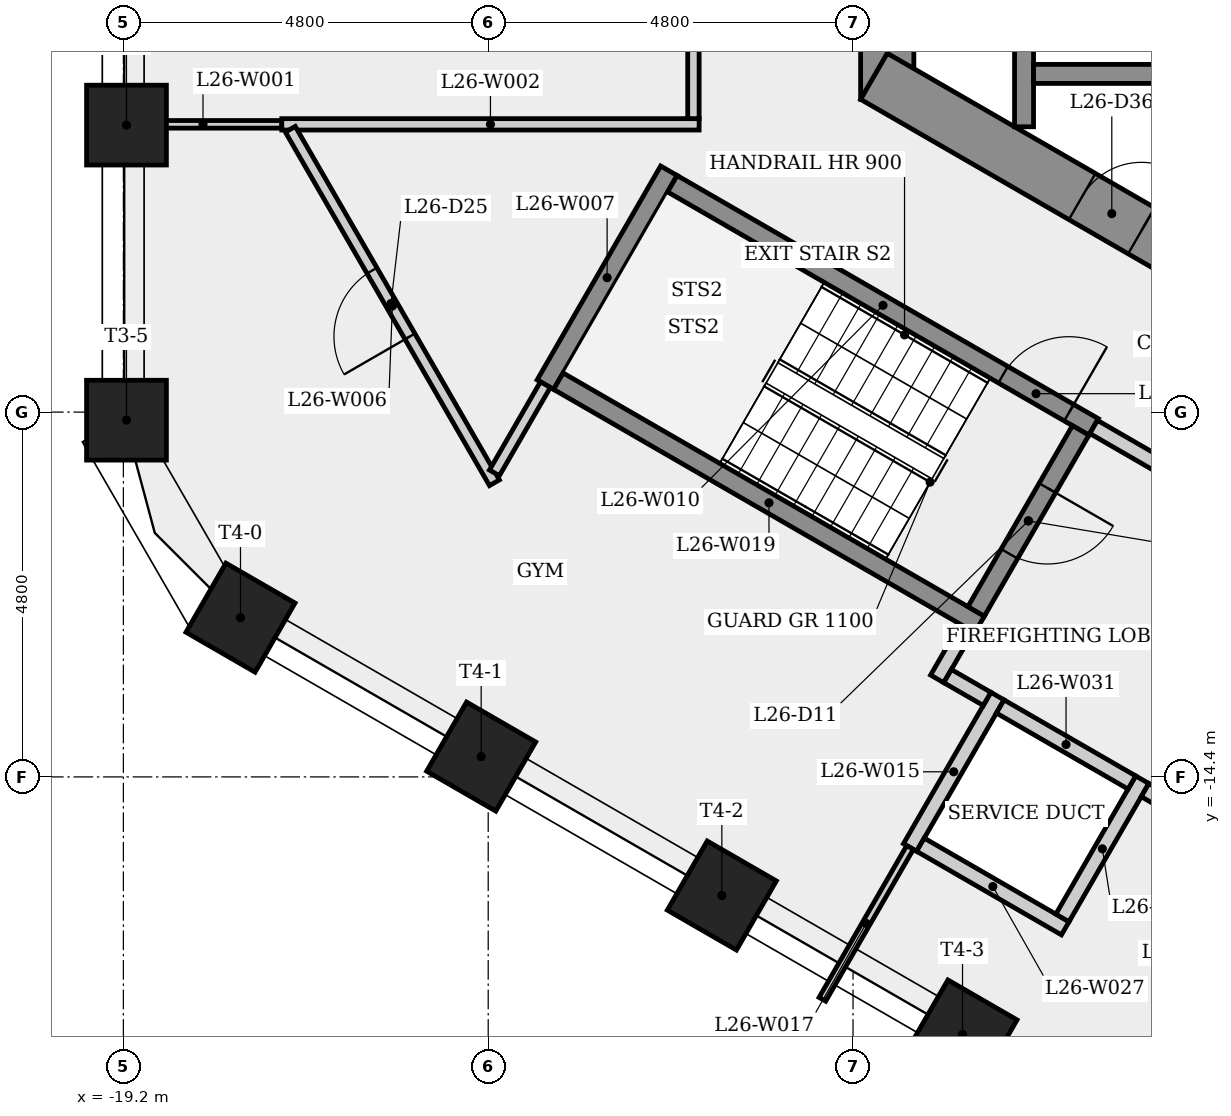
"""IFC4 building model, lengths in metres.
Left out: names, types, materials, properties, quantities, classifications, styles, units other than length and angle.
Written with IfcOpenShell. Run it as: python <this file> out.ifc"""

import sys

from ifc_helpers import new_model, si_unit, direction, frame, frame_2d, origin, origin_2d, place, context, subcontext, project, spatial, rectangle, extrude, element, fill, save


model = new_model("IFC4")
c1 = context("Model", 3, precision=1e-05, world=origin(), true_north=direction((0.0, 1.0)))
c2 = subcontext(c1, "Body", "Model", "MODEL_VIEW")
j1 = project(units=[si_unit("LENGTHUNIT", "METRE"), si_unit("PLANEANGLEUNIT", "RADIAN")], contexts=[c1])
p1 = place(None, origin())
s1 = spatial("IfcSite", under=j1, at=p1, CompositionType="ELEMENT")
p2 = place(p1, origin())
s2 = spatial("IfcBuilding", under=s1, at=p2, CompositionType="ELEMENT")
p3 = place(p2, frame((0.0, 0.0, 100.1)))
s3 = spatial("IfcBuildingStorey", under=s2, at=p3, CompositionType="ELEMENT", Elevation=100.1)
p4 = place(p3, frame((-9.15, 5.485, 0.0), z_axis=(0.0, 0.0, 1.0), x_axis=(0.0, -1.0, 0.0)))
e1 = element("IfcWall", 1, at=p4, inside=s3, PredefinedType="SHEAR", context=c2, shape_type="SweptSolid", body=[
    extrude(rectangle(XDim=10.97, YDim=0.7, at=frame_2d((5.485, 0.0))), origin(), (0.0, 0.0, 1.0), 3.4),
])
p5 = place(p4, frame((4.685, 0.0, 0.0)))
e2 = element("IfcOpeningElement", 2, at=p5, cuts=e1, PredefinedType="OPENING", context=c2, shape_type="SweptSolid", body=[
    extrude(rectangle(XDim=1.6, YDim=2.1, at=frame_2d((0.8, 1.05))), frame((0.0, 0.36, 0.0), z_axis=(0.0, -1.0, 0.0), x_axis=(1.0, 0.0, 0.0)), (0.0, 0.0, 1.0), 0.72),
])
p6 = place(p3, frame((-9.325, -5.182, 0.0), z_axis=(0.0, 0.0, 1.0), x_axis=(0.866023993627, -0.500002442456, 0.0)))
e3 = element("IfcWall", 3, at=p6, inside=s3, PredefinedType="SHEAR", context=c2, shape_type="SweptSolid", body=[
    extrude(rectangle(XDim=10.97, YDim=0.7, at=frame_2d((5.485, 0.0))), origin(), (0.0, 0.0, 1.0), 3.4),
])
p7 = place(p6, frame((3.164, 0.0, 0.0)))
e4 = element("IfcOpeningElement", 4, at=p7, cuts=e3, PredefinedType="OPENING", context=c2, shape_type="SweptSolid", body=[
    extrude(rectangle(XDim=0.9, YDim=2.1, at=frame_2d((0.45, 1.05))), frame((0.0, 0.36, 0.0), z_axis=(0.0, -1.0, 0.0), x_axis=(1.0, 0.0, 0.0)), (0.0, 0.0, 1.0), 0.72),
])
for number, where, z_axis, x_axis in (
    (5, (-19.159, -5.824, 0.0), (0.0, 0.0, 1.0), (-1.0, 0.0, 0.0)),
    (6, (-19.159, -9.706, 0.0), (0.0, 0.0, 1.0), (-1.0, 0.0, 0.0)),
    (7, (-17.659, -12.304, 0.0), (0.0, 0.0, 1.0), (-0.5, -0.866, 0.0)),
    (8, (-14.493, -14.133, 0.0), (0.0, 0.0, 1.0), (-0.5, -0.866, 0.0)),
    (9, (-11.326, -15.961, 0.0), (0.0, 0.0, 1.0), (-0.5, -0.866, 0.0)),
    (10, (-8.159, -17.789, 0.0), (0.0, 0.0, 1.0), (-0.5, -0.866, 0.0)),
):
    element("IfcColumn", number, at=place(p3, frame(where, z_axis=z_axis, x_axis=x_axis)), inside=s3, PredefinedType="COLUMN", context=c2, shape_type="SweptSolid", body=[
        extrude(rectangle(XDim=1.05, YDim=1.05, at=origin_2d()), origin(), (0.0, 0.0, 1.0), 3.4),
    ])
p8 = place(p3, frame((-17.116, -5.814, 0.0), z_axis=(0.0, 0.0, 1.0), x_axis=(-1.0, 0.0, 0.0)))
e11 = element("IfcWall", 11, at=p8, inside=s3, PredefinedType="PARTITIONING", context=c2, shape_type="SweptSolid", body=[
    extrude(rectangle(XDim=2.073, YDim=0.1, at=frame_2d((1.037, 0.0))), origin(), (0.0, 0.0, 1.0), 3.05),
])
p9 = place(p3, frame((-17.116, -5.814, 0.0), z_axis=(0.0, 0.0, 1.0), x_axis=(1.0, 0.0, 0.0)))
e12 = element("IfcWall", 12, at=p9, inside=s3, PredefinedType="PARTITIONING", context=c2, shape_type="SweptSolid", body=[
    extrude(rectangle(XDim=5.491, YDim=0.15, at=frame_2d((2.745, 0.0))), origin(), (0.0, 0.0, 1.0), 3.05),
])
p10 = place(p3, frame((-14.318, -10.53, 0.0), z_axis=(0.0, 0.0, 1.0), x_axis=(-0.499996591357, 0.866027371756, 0.0)))
e13 = element("IfcWall", 13, at=p10, inside=s3, PredefinedType="PARTITIONING", context=c2, shape_type="SweptSolid", body=[
    extrude(rectangle(XDim=5.371, YDim=0.15, at=frame_2d((2.685, 0.0))), origin(), (0.0, 0.0, 1.0), 3.05),
])
p11 = place(p10, frame((2.223, 0.0, 0.0)))
e14 = element("IfcOpeningElement", 14, at=p11, cuts=e13, PredefinedType="OPENING", context=c2, shape_type="SweptSolid", body=[
    extrude(rectangle(XDim=1.0, YDim=2.1, at=frame_2d((0.5, 1.05))), frame((0.0, 0.085, 0.0), z_axis=(0.0, -1.0, 0.0), x_axis=(1.0, 0.0, 0.0)), (0.0, 0.0, 1.0), 0.17),
])
p12 = place(p3, frame((-13.648, -9.239, 0.0), z_axis=(0.0, 0.0, 1.0), x_axis=(0.500017246033, 0.866015446554, 0.0)))
e15 = element("IfcWall", 15, at=p12, inside=s3, PredefinedType="SHEAR", context=c2, shape_type="SweptSolid", body=[
    extrude(rectangle(XDim=3.25, YDim=0.25, at=frame_2d((1.625, 0.0))), origin(), (0.0, 0.0, 1.0), 3.05),
])
p13 = place(p3, frame((-13.648, -9.239, 0.0), z_axis=(0.0, 0.0, 1.0), x_axis=(-0.500095536422, -0.865970238779, 0.0)))
e16 = element("IfcWall", 16, at=p13, inside=s3, PredefinedType="PARTITIONING", context=c2, shape_type="SweptSolid", body=[
    extrude(rectangle(XDim=1.341, YDim=0.15, at=frame_2d((0.67, 0.0))), origin(), (0.0, 0.0, 1.0), 3.05),
])
p14 = place(p3, frame((-11.977, -6.595, 0.0), z_axis=(0.0, 0.0, 1.0), x_axis=(0.866025499775, -0.499999833739, 0.0)))
e17 = element("IfcWall", 17, at=p14, inside=s3, PredefinedType="SHEAR", context=c2, shape_type="SweptSolid", body=[
    extrude(rectangle(XDim=6.4, YDim=0.25, at=frame_2d((3.2, 0.0))), origin(), (0.0, 0.0, 1.0), 3.05),
])
p15 = place(p14, frame((5.025, 0.0, 0.0)))
e18 = element("IfcOpeningElement", 18, at=p15, cuts=e17, PredefinedType="OPENING", context=c2, shape_type="SweptSolid", body=[
    extrude(rectangle(XDim=1.0, YDim=2.1, at=frame_2d((0.5, 1.05))), frame((0.0, 0.135, 0.0), z_axis=(0.0, -1.0, 0.0), x_axis=(1.0, 0.0, 0.0)), (0.0, 0.0, 1.0), 0.27),
])
p16 = place(p3, frame((-11.7, -5.739, 0.0), z_axis=(0.0, 0.0, 1.0), x_axis=(0.0, 1.0, 0.0)))
e19 = element("IfcWall", 19, at=p16, inside=s3, PredefinedType="PARTITIONING", context=c2, shape_type="SweptSolid", body=[
    extrude(rectangle(XDim=11.477, YDim=0.15, at=frame_2d((5.739, 0.0))), origin(), (0.0, 0.0, 1.0), 3.05),
])
p17 = place(p16, frame((8.123, 0.0, 0.0)))
e20 = element("IfcOpeningElement", 20, at=p17, cuts=e19, PredefinedType="OPENING", context=c2, shape_type="SweptSolid", body=[
    extrude(rectangle(XDim=1.0, YDim=2.1, at=frame_2d((0.5, 1.05))), frame((0.0, 0.085, 0.0), z_axis=(0.0, -1.0, 0.0), x_axis=(1.0, 0.0, 0.0)), (0.0, 0.0, 1.0), 0.17),
])
p18 = place(p16, frame((2.354, 0.0, 0.0)))
e21 = element("IfcOpeningElement", 21, at=p18, cuts=e19, PredefinedType="OPENING", context=c2, shape_type="SweptSolid", body=[
    extrude(rectangle(XDim=1.0, YDim=2.1, at=frame_2d((0.5, 1.05))), frame((0.0, 0.085, 0.0), z_axis=(0.0, -1.0, 0.0), x_axis=(1.0, 0.0, 0.0)), (0.0, 0.0, 1.0), 0.17),
])
p19 = place(p3, frame((-8.85, -15.329, 0.0), z_axis=(0.0, 0.0, 1.0), x_axis=(0.500077740698, 0.865980515519, 0.0)))
e22 = element("IfcWall", 22, at=p19, inside=s3, PredefinedType="PLUMBINGWALL", context=c2, shape_type="SweptSolid", body=[
    extrude(rectangle(XDim=2.3, YDim=0.2, at=frame_2d((1.15, 0.0))), origin(), (0.0, 0.0, 1.0), 3.05),
])
p20 = place(p3, frame((-8.85, -15.329, 0.0), z_axis=(0.0, 0.0, 1.0), x_axis=(-0.500009533716, -0.866019899421, 0.0)))
e23 = element("IfcWall", 23, at=p20, inside=s3, PredefinedType="PARTITIONING", context=c2, shape_type="SweptSolid", body=[
    extrude(rectangle(XDim=2.307, YDim=0.1, at=frame_2d((1.153, 0.0))), origin(), (0.0, 0.0, 1.0), 3.05),
])
p21 = place(p3, frame((-8.493, -13.11, 0.0), z_axis=(0.0, 0.0, 1.0), x_axis=(0.500067724834, 0.865986299303, 0.0)))
e24 = element("IfcWall", 24, at=p21, inside=s3, PredefinedType="PARTITIONING", context=c2, shape_type="SweptSolid", body=[
    extrude(rectangle(XDim=0.775, YDim=0.2, at=frame_2d((0.388, 0.0))), origin(), (0.0, 0.0, 1.0), 3.05),
])
p22 = place(p3, frame((-7.935, -12.393, 0.0), z_axis=(0.0, 0.0, 1.0), x_axis=(-0.866025499775, 0.499999833739, 0.0)))
e25 = element("IfcWall", 25, at=p22, inside=s3, PredefinedType="SHEAR", context=c2, shape_type="SweptSolid", body=[
    extrude(rectangle(XDim=6.4, YDim=0.25, at=frame_2d((3.2, 0.0))), origin(), (0.0, 0.0, 1.0), 3.05),
])
p23 = place(p3, frame((-7.836, -13.373, 0.0), z_axis=(0.0, 0.0, 1.0), x_axis=(-0.866232998003, 0.499640263761, 0.0)))
e26 = element("IfcWall", 26, at=p23, inside=s3, PredefinedType="PARTITIONING", context=c2, shape_type="SweptSolid", body=[
    extrude(rectangle(XDim=0.6, YDim=0.2, at=frame_2d((0.3, 0.0))), origin(), (0.0, 0.0, 1.0), 3.05),
])
p24 = place(p3, frame((-7.35, -5.846, 0.0), z_axis=(0.0, 0.0, 1.0), x_axis=(0.0, 1.0, 0.0)))
e27 = element("IfcWall", 27, at=p24, inside=s3, PredefinedType="SHEAR", context=c2, shape_type="SweptSolid", body=[
    extrude(rectangle(XDim=4.171, YDim=0.25, at=frame_2d((2.085, 0.0))), origin(), (0.0, 0.0, 1.0), 3.05),
])
p25 = place(p3, frame((-6.808, -16.392, 0.0), z_axis=(0.0, 0.0, 1.0), x_axis=(-0.866008176907, 0.50002983664, 0.0)))
e28 = element("IfcWall", 28, at=p25, inside=s3, PredefinedType="PLUMBINGWALL", context=c2, shape_type="SweptSolid", body=[
    extrude(rectangle(XDim=2.2, YDim=0.2, at=frame_2d((1.1, 0.0))), origin(), (0.0, 0.0, 1.0), 3.05),
])
p26 = place(p3, frame((-6.605, -9.841, 0.0), z_axis=(0.0, 0.0, 1.0), x_axis=(-0.499996545922, -0.866027397988, 0.0)))
e29 = element("IfcWall", 29, at=p26, inside=s3, PredefinedType="SHEAR", context=c2, shape_type="SweptSolid", body=[
    extrude(rectangle(XDim=2.75, YDim=0.25, at=frame_2d((1.375, 0.0))), origin(), (0.0, 0.0, 1.0), 3.05),
])
p27 = place(p26, frame((0.875, 0.0, 0.0)))
e30 = element("IfcOpeningElement", 30, at=p27, cuts=e29, PredefinedType="OPENING", context=c2, shape_type="SweptSolid", body=[
    extrude(rectangle(XDim=1.0, YDim=2.1, at=frame_2d((0.5, 1.05))), frame((0.0, 0.135, 0.0), z_axis=(0.0, -1.0, 0.0), x_axis=(1.0, 0.0, 0.0)), (0.0, 0.0, 1.0), 0.27),
])
p28 = place(p3, frame((-6.435, -9.795, 0.0), z_axis=(0.0, 0.0, 1.0), x_axis=(0.866012907634, -0.500021643343, 0.0)))
e31 = element("IfcWall", 31, at=p28, inside=s3, PredefinedType="PARTITIONING", context=c2, shape_type="SweptSolid", body=[
    extrude(rectangle(XDim=4.45, YDim=0.2, at=frame_2d((2.225, 0.0))), origin(), (0.0, 0.0, 1.0), 3.05),
])
p29 = place(p28, frame((1.675, 0.0, 0.0)))
e32 = element("IfcOpeningElement", 32, at=p29, cuts=e31, PredefinedType="OPENING", context=c2, shape_type="SweptSolid", body=[
    extrude(rectangle(XDim=1.1, YDim=2.1, at=frame_2d((0.55, 1.05))), frame((0.0, 0.11, 0.0), z_axis=(0.0, -1.0, 0.0), x_axis=(1.0, 0.0, 0.0)), (0.0, 0.0, 1.0), 0.22),
])
p30 = place(p3, frame((-5.795, -14.437, 0.0), z_axis=(0.0, 0.0, 1.0), x_axis=(-0.500027713859, -0.866009402589, 0.0)))
e33 = element("IfcWall", 33, at=p30, inside=s3, PredefinedType="PLUMBINGWALL", context=c2, shape_type="SweptSolid", body=[
    extrude(rectangle(XDim=2.1, YDim=0.2, at=frame_2d((1.05, 0.0))), origin(), (0.0, 0.0, 1.0), 3.05),
])
p31 = place(p3, frame((-5.931, -14.473, 0.0), z_axis=(0.0, 0.0, 1.0), x_axis=(-0.866041268327, 0.499972520799, 0.0)))
e34 = element("IfcWall", 34, at=p31, inside=s3, PredefinedType="PLUMBINGWALL", context=c2, shape_type="SweptSolid", body=[
    extrude(rectangle(XDim=2.0, YDim=0.2, at=frame_2d((1.0, 0.0))), origin(), (0.0, 0.0, 1.0), 3.05),
])
p32 = place(p3, frame((-7.225, -5.15, 0.0), z_axis=(0.0, 0.0, 1.0), x_axis=(1.0, 0.0, 0.0)))
e35 = element("IfcWall", 35, at=p32, inside=s3, PredefinedType="SHEAR", context=c2, shape_type="SweptSolid", body=[
    extrude(rectangle(XDim=14.7, YDim=0.25, at=frame_2d((7.35, 0.0))), origin(), (0.0, 0.0, 1.0), 3.05),
])
p33 = place(p3, frame((-4.286, -15.423, 0.0), z_axis=(0.0, 0.0, 1.0), x_axis=(-0.866025371046, 0.500000056704, 0.0)))
e36 = element("IfcWall", 36, at=p33, inside=s3, PredefinedType="PARTITIONING", context=c2, shape_type="SweptSolid", body=[
    extrude(rectangle(XDim=1.7, YDim=0.2, at=frame_2d((0.85, 0.0))), origin(), (0.0, 0.0, 1.0), 3.05),
])
p34 = place(p15, origin())
e37 = element("IfcDoor", 37, at=p34, inside=s3, OperationType="SINGLE_SWING_RIGHT", PredefinedType="DOOR", context=c2, shape_type="SweptSolid", body=[
    extrude(rectangle(XDim=1.0, YDim=2.1, at=frame_2d((0.5, 1.05))), frame((0.0, 0.025, 0.0), z_axis=(0.0, -1.0, 0.0), x_axis=(1.0, 0.0, 0.0)), (0.0, 0.0, 1.0), 0.05),
])
fill(e18, e37)
p35 = place(p27, origin())
e38 = element("IfcDoor", 38, at=p35, inside=s3, OperationType="SINGLE_SWING_LEFT", PredefinedType="DOOR", context=c2, shape_type="SweptSolid", body=[
    extrude(rectangle(XDim=1.0, YDim=2.1, at=frame_2d((0.5, 1.05))), frame((0.0, 0.025, 0.0), z_axis=(0.0, -1.0, 0.0), x_axis=(1.0, 0.0, 0.0)), (0.0, 0.0, 1.0), 0.05),
])
fill(e30, e38)
p36 = place(p11, origin())
e39 = element("IfcDoor", 39, at=p36, inside=s3, OperationType="SINGLE_SWING_LEFT", PredefinedType="DOOR", context=c2, shape_type="SweptSolid", body=[
    extrude(rectangle(XDim=1.0, YDim=2.1, at=frame_2d((0.5, 1.05))), frame((0.0, 0.025, 0.0), z_axis=(0.0, -1.0, 0.0), x_axis=(1.0, 0.0, 0.0)), (0.0, 0.0, 1.0), 0.05),
])
fill(e14, e39)
p37 = place(p7, origin())
e40 = element("IfcDoor", 40, at=p37, inside=s3, OperationType="SINGLE_SWING_RIGHT", PredefinedType="DOOR", context=c2, shape_type="SweptSolid", body=[
    extrude(rectangle(XDim=0.9, YDim=2.1, at=frame_2d((0.45, 1.05))), frame((0.0, 0.025, 0.0), z_axis=(0.0, -1.0, 0.0), x_axis=(1.0, 0.0, 0.0)), (0.0, 0.0, 1.0), 0.05),
])
fill(e4, e40)
save(model, sys.argv[1])
